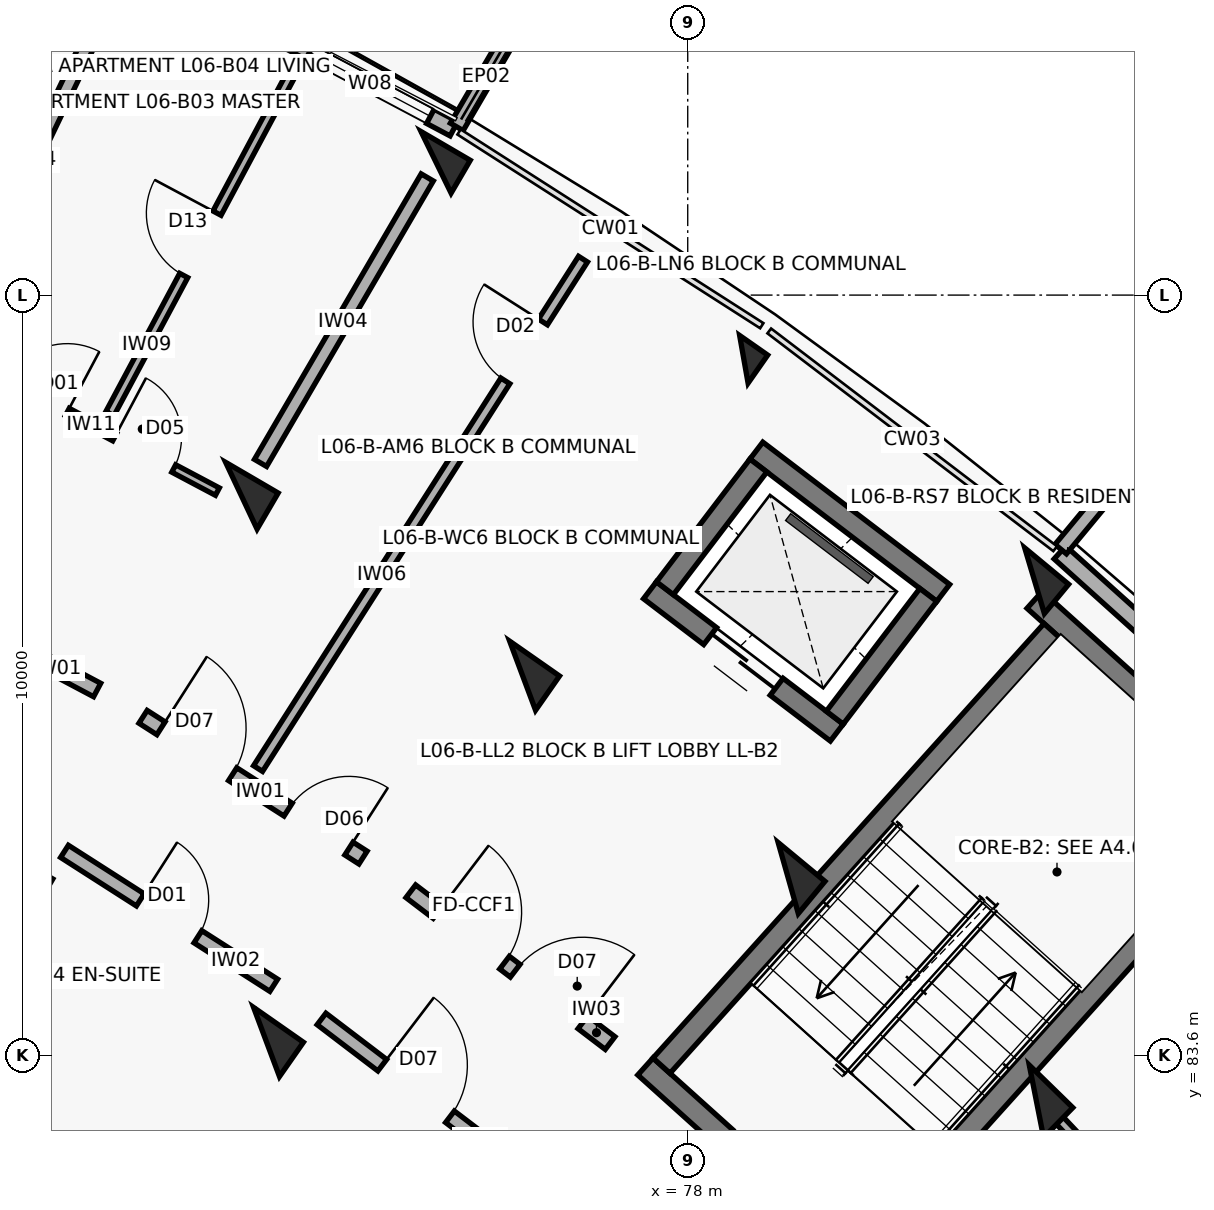
"""IFC4 building model, lengths in metres.
Left out: names, types, materials, properties, quantities, classifications, styles, units other than length and angle.
Written with IfcOpenShell. Run it as: python <this file> out.ifc"""

import sys

from ifc_helpers import new_model, si_unit, direction, frame, frame_2d, origin, origin_2d, place, context, subcontext, project, spatial, rectangle, extrude, element, fill, save


model = new_model("IFC4")
c1 = context("Model", 3, precision=1e-05, world=origin(), true_north=direction((0.0, 1.0)))
c2 = subcontext(c1, "Body", "Model", "MODEL_VIEW")
j1 = project(units=[si_unit("LENGTHUNIT", "METRE"), si_unit("PLANEANGLEUNIT", "RADIAN")], contexts=[c1])
p1 = place(None, origin())
s1 = spatial("IfcSite", under=j1, at=p1, CompositionType="ELEMENT")
p2 = place(p1, origin())
s2 = spatial("IfcBuilding", under=s1, at=p2, CompositionType="ELEMENT")
p3 = place(p2, frame((0.0, 0.0, 20.5)))
s3 = spatial("IfcBuildingStorey", under=s2, at=p3, CompositionType="ELEMENT", Elevation=20.5)
for number, where, z_axis, x_axis in (
    (1, (69.163, 85.882, 0.0), (0.0, 0.0, 1.0), (0.504, 0.864, 0.0)),
    (2, (72.127, 90.96, 0.0), (0.0, 0.0, 1.0), (0.504, 0.864, 0.0)),
):
    element("IfcColumn", number, at=place(p3, frame(where, z_axis=z_axis, x_axis=x_axis)), inside=s3, PredefinedType="COLUMN", context=c2, shape_type="SweptSolid", body=[
        extrude(rectangle(XDim=0.55, YDim=0.8, at=origin_2d()), origin(), (0.0, 0.0, 1.0), 3.1),
    ])
p4 = place(p3, frame((74.689, 95.347, 0.0), z_axis=(0.0, 0.0, 1.0), x_axis=(0.504226211181, 0.863571611366, 0.0)))
e3 = element("IfcColumn", 3, at=p4, inside=s3, PredefinedType="COLUMN", context=c2, shape_type="SweptSolid", body=[
    extrude(rectangle(XDim=0.5, YDim=0.75, at=origin_2d()), origin(), (0.0, 0.0, 1.0), 3.1),
])
for number, where, z_axis, x_axis in (
    (4, (72.458, 83.773, 0.0), (0.0, 0.0, 1.0), (0.573, 0.82, 0.0)),
    (5, (75.828, 88.592, 0.0), (0.0, 0.0, 1.0), (0.573, 0.82, 0.0)),
):
    element("IfcColumn", number, at=place(p3, frame(where, z_axis=z_axis, x_axis=x_axis)), inside=s3, PredefinedType="COLUMN", context=c2, shape_type="SweptSolid", body=[
        extrude(rectangle(XDim=0.55, YDim=0.8, at=origin_2d()), origin(), (0.0, 0.0, 1.0), 3.1),
    ])
p5 = place(p3, frame((78.739, 92.755, 0.0), z_axis=(0.0, 0.0, 1.0), x_axis=(0.573004420611, 0.819552276527, 0.0)))
e6 = element("IfcColumn", 6, at=p5, inside=s3, PredefinedType="COLUMN", context=c2, shape_type="SweptSolid", body=[
    extrude(rectangle(XDim=0.45, YDim=0.45, at=origin_2d()), origin(), (0.0, 0.0, 1.0), 3.1),
])
p6 = place(p3, frame((79.322, 85.93, 0.0), z_axis=(0.0, 0.0, 1.0), x_axis=(0.637961754089, 0.770068049148, 0.0)))
e7 = element("IfcColumn", 7, at=p6, inside=s3, PredefinedType="COLUMN", context=c2, shape_type="SweptSolid", body=[
    extrude(rectangle(XDim=0.55, YDim=0.8, at=origin_2d()), origin(), (0.0, 0.0, 1.0), 3.1),
])
p7 = place(p3, frame((82.563, 89.842, 0.0), z_axis=(0.0, 0.0, 1.0), x_axis=(0.637961754089, 0.770068049148, 0.0)))
e8 = element("IfcColumn", 8, at=p7, inside=s3, PredefinedType="COLUMN", context=c2, shape_type="SweptSolid", body=[
    extrude(rectangle(XDim=0.5, YDim=0.75, at=origin_2d()), origin(), (0.0, 0.0, 1.0), 3.1),
])
p8 = place(p3, frame((82.588, 82.991, 0.0), z_axis=(0.0, 0.0, 1.0), x_axis=(0.698665066769, 0.715448897181, 0.0)))
e9 = element("IfcColumn", 9, at=p8, inside=s3, PredefinedType="COLUMN", context=c2, shape_type="SweptSolid", body=[
    extrude(rectangle(XDim=0.55, YDim=0.8, at=origin_2d()), origin(), (0.0, 0.0, 1.0), 3.1),
])
p9 = place(p3, frame((70.675, 98.042, 0.0), z_axis=(0.0, 0.0, 1.0), x_axis=(0.883448093208, -0.468529045639, 0.0)))
e10 = element("IfcWall", 10, at=p9, inside=s3, PredefinedType="SOLIDWALL", context=c2, shape_type="SweptSolid", body=[
    extrude(rectangle(XDim=4.809, YDim=0.212, at=frame_2d((2.405, 0.0))), origin(), (0.0, 0.0, 1.0), 2.25),
])
p10 = place(p9, frame((0.4, 0.0, 0.0)))
e11 = element("IfcOpeningElement", 11, at=p10, cuts=e10, PredefinedType="OPENING", context=c2, shape_type="SweptSolid", body=[
    extrude(rectangle(XDim=1.1, YDim=2.15, at=frame_2d((0.55, 1.075))), frame((0.0, 0.116, 0.0), z_axis=(0.0, -1.0, 0.0), x_axis=(1.0, 0.0, 0.0)), (0.0, 0.0, 1.0), 0.232),
])
p11 = place(p9, frame((2.659, 0.0, 0.35)))
e12 = element("IfcOpeningElement", 12, at=p11, cuts=e10, PredefinedType="OPENING", context=c2, shape_type="SweptSolid", body=[
    extrude(rectangle(XDim=1.8, YDim=1.65, at=frame_2d((0.9, 0.825))), frame((0.0, 0.116, 0.0), z_axis=(0.0, -1.0, 0.0), x_axis=(1.0, 0.0, 0.0)), (0.0, 0.0, 1.0), 0.232),
])
p12 = place(p3, frame((74.961, 95.813, 0.0), z_axis=(0.0, 0.0, 1.0), x_axis=(0.504228145431, 0.863570481985, 0.0)))
e13 = element("IfcWall", 13, at=p12, inside=s3, PredefinedType="PARAPET", context=c2, shape_type="SweptSolid", body=[
    extrude(rectangle(XDim=1.53, YDim=0.195, at=frame_2d((0.765, 0.0))), origin(), (0.0, 0.0, 1.0), 2.25),
])
p13 = place(p3, frame((82.897, 90.213, 0.0), z_axis=(0.0, 0.0, 1.0), x_axis=(0.743387539862, -0.668860946369, 0.0)))
e14 = element("IfcWall", 14, at=p13, inside=s3, PredefinedType="SOLIDWALL", context=c2, shape_type="SweptSolid", body=[
    extrude(rectangle(XDim=4.809, YDim=0.228, at=frame_2d((2.405, 0.0))), origin(), (0.0, 0.0, 1.0), 2.25),
])
p14 = place(p3, frame((82.908, 90.257, 0.0), z_axis=(0.0, 0.0, 1.0), x_axis=(0.637967316825, 0.770063440674, 0.0)))
e15 = element("IfcWall", 15, at=p14, inside=s3, PredefinedType="PARAPET", context=c2, shape_type="SweptSolid", body=[
    extrude(rectangle(XDim=0.9, YDim=0.195, at=frame_2d((0.45, 0.0))), origin(), (0.0, 0.0, 1.0), 2.25),
])
p15 = place(p3, frame((80.32, 80.862, 0.0), z_axis=(0.0, 0.0, 1.0), x_axis=(-0.743375696158, 0.668874109501, 0.0)))
e16 = element("IfcWall", 16, at=p15, inside=s3, PredefinedType="SHEAR", context=c2, shape_type="SweptSolid", body=[
    extrude(rectangle(XDim=3.87, YDim=0.3, at=frame_2d((1.935, 0.0))), origin(), (0.0, 0.0, 1.0), 3.1),
])
p16 = place(p15, frame((1.41, 0.0, 0.0)))
e17 = element("IfcOpeningElement", 17, at=p16, cuts=e16, PredefinedType="OPENING", context=c2, shape_type="SweptSolid", body=[
    extrude(rectangle(XDim=1.05, YDim=2.15, at=frame_2d((0.525, 1.075))), frame((0.0, 0.16, 0.0), z_axis=(0.0, -1.0, 0.0), x_axis=(1.0, 0.0, 0.0)), (0.0, 0.0, 1.0), 0.32),
])
p17 = place(p3, frame((85.887, 86.601, 0.0), z_axis=(0.0, 0.0, 1.0), x_axis=(-0.743400052815, 0.668847038922, 0.0)))
e18 = element("IfcWall", 18, at=p17, inside=s3, PredefinedType="SHEAR", context=c2, shape_type="SweptSolid", body=[
    extrude(rectangle(XDim=4.47, YDim=0.3, at=frame_2d((2.235, 0.0))), origin(), (0.0, 0.0, 1.0), 3.1),
])
p18 = place(p3, frame((80.309, 81.073, 0.0), z_axis=(0.0, 0.0, 1.0), x_axis=(0.668885797871, 0.743365179038, 0.0)))
e19 = element("IfcWall", 19, at=p18, inside=s3, PredefinedType="SHEAR", context=c2, shape_type="SweptSolid", body=[
    extrude(rectangle(XDim=7.69, YDim=0.3, at=frame_2d((3.845, 0.0))), origin(), (0.0, 0.0, 1.0), 3.1),
])
p19 = place(p3, frame((77.655, 83.461, 0.0), z_axis=(0.0, 0.0, 1.0), x_axis=(0.668868253964, 0.743380964808, 0.0)))
e20 = element("IfcWall", 20, at=p19, inside=s3, PredefinedType="SHEAR", context=c2, shape_type="SweptSolid", body=[
    extrude(rectangle(XDim=7.69, YDim=0.3, at=frame_2d((3.845, 0.0))), origin(), (0.0, 0.0, 1.0), 3.1),
])
p20 = place(p3, frame((79.961, 87.844, 0.0), z_axis=(0.0, 0.0, 1.0), x_axis=(-0.795464365424, 0.606000365793, 0.0)))
e21 = element("IfcWall", 21, at=p20, inside=s3, PredefinedType="SHEAR", context=c2, shape_type="SweptSolid", body=[
    extrude(rectangle(XDim=3.09, YDim=0.28, at=frame_2d((1.545, 0.0))), origin(), (0.0, 0.0, 1.0), 3.1),
])
p21 = place(p20, frame((0.995, 0.0, 0.0)))
e22 = element("IfcOpeningElement", 22, at=p21, cuts=e21, PredefinedType="OPENING", context=c2, shape_type="SweptSolid", body=[
    extrude(rectangle(XDim=1.1, YDim=2.15, at=frame_2d((0.55, 1.075))), frame((0.0, 0.15, 0.0), z_axis=(0.0, -1.0, 0.0), x_axis=(1.0, 0.0, 0.0)), (0.0, 0.0, 1.0), 0.3),
])
p22 = place(p3, frame((81.361, 89.681, 0.0), z_axis=(0.0, 0.0, 1.0), x_axis=(-0.795502452183, 0.605950368076, 0.0)))
e23 = element("IfcWall", 23, at=p22, inside=s3, PredefinedType="SHEAR", context=c2, shape_type="SweptSolid", body=[
    extrude(rectangle(XDim=3.09, YDim=0.28, at=frame_2d((1.545, 0.0))), origin(), (0.0, 0.0, 1.0), 3.1),
])
for number, where, z_axis, x_axis in (
    (24, (79.935, 88.04, 0.0), (0.0, 0.0, 1.0), (0.606, 0.795, 0.0)),
    (25, (77.699, 89.743, 0.0), (0.0, 0.0, 1.0), (0.606, 0.795, 0.0)),
):
    element("IfcWall", number, at=place(p3, frame(where, z_axis=z_axis, x_axis=x_axis)), inside=s3, PredefinedType="SHEAR", context=c2, shape_type="SweptSolid", body=[
        extrude(rectangle(XDim=2.03, YDim=0.28, at=frame_2d((1.015, 0.0))), origin(), (0.0, 0.0, 1.0), 3.1),
    ])
p23 = place(p3, frame((67.194, 90.014, 0.0), z_axis=(0.0, 0.0, 1.0), x_axis=(0.883410853063, -0.468599258099, 0.0)))
e26 = element("IfcWall", 26, at=p23, inside=s3, PredefinedType="SOLIDWALL", context=c2, shape_type="SweptSolid", body=[
    extrude(rectangle(XDim=3.436, YDim=0.2, at=frame_2d((1.718, 0.0))), origin(), (0.0, 0.0, 1.0), 2.08),
])
p24 = place(p23, frame((1.208, 0.0, 0.0)))
e27 = element("IfcOpeningElement", 27, at=p24, cuts=e26, PredefinedType="OPENING", context=c2, shape_type="SweptSolid", body=[
    extrude(rectangle(XDim=1.02, YDim=2.15, at=frame_2d((0.51, 1.075))), frame((0.0, 0.11, 0.0), z_axis=(0.0, -1.0, 0.0), x_axis=(1.0, 0.0, 0.0)), (0.0, 0.0, 1.0), 0.22),
])
p25 = place(p3, frame((68.468, 92.788, 0.0), z_axis=(0.0, 0.0, 1.0), x_axis=(0.883450371448, -0.468524749814, 0.0)))
e28 = element("IfcWall", 28, at=p25, inside=s3, PredefinedType="PARTITIONING", context=c2, shape_type="SweptSolid", body=[
    extrude(rectangle(XDim=3.785, YDim=0.11, at=frame_2d((1.893, 0.0))), origin(), (0.0, 0.0, 1.0), 2.08),
])
p26 = place(p25, frame((0.65, 0.0, 0.0)))
e29 = element("IfcOpeningElement", 29, at=p26, cuts=e28, PredefinedType="OPENING", context=c2, shape_type="SweptSolid", body=[
    extrude(rectangle(XDim=0.9, YDim=2.1, at=frame_2d((0.45, 1.05))), frame((0.0, 0.065, 0.0), z_axis=(0.0, -1.0, 0.0), x_axis=(1.0, 0.0, 0.0)), (0.0, 0.0, 1.0), 0.13),
])
p27 = place(p25, frame((2.255, 0.0, 0.0)))
e30 = element("IfcOpeningElement", 30, at=p27, cuts=e28, PredefinedType="OPENING", context=c2, shape_type="SweptSolid", body=[
    extrude(rectangle(XDim=0.88, YDim=2.1, at=frame_2d((0.44, 1.05))), frame((0.0, 0.065, 0.0), z_axis=(0.0, -1.0, 0.0), x_axis=(1.0, 0.0, 0.0)), (0.0, 0.0, 1.0), 0.13),
])
p28 = place(p3, frame((70.398, 92.041, 0.0), z_axis=(0.0, 0.0, 1.0), x_axis=(0.471222960991, 0.882014127457, 0.0)))
e31 = element("IfcWall", 31, at=p28, inside=s3, PredefinedType="PARTITIONING", context=c2, shape_type="SweptSolid", body=[
    extrude(rectangle(XDim=5.05, YDim=0.12, at=frame_2d((2.525, 0.0))), origin(), (0.0, 0.0, 1.0), 2.08),
])
p29 = place(p28, frame((2.06, 0.0, 0.0)))
e32 = element("IfcOpeningElement", 32, at=p29, cuts=e31, PredefinedType="OPENING", context=c2, shape_type="SweptSolid", body=[
    extrude(rectangle(XDim=0.93, YDim=2.1, at=frame_2d((0.465, 1.05))), frame((0.0, 0.07, 0.0), z_axis=(0.0, -1.0, 0.0), x_axis=(1.0, 0.0, 0.0)), (0.0, 0.0, 1.0), 0.14),
])
p30 = place(p3, frame((68.462, 93.469, 0.0), z_axis=(0.0, 0.0, 1.0), x_axis=(0.432086898897, 0.901831975371, 0.0)))
e33 = element("IfcWall", 33, at=p30, inside=s3, PredefinedType="SOLIDWALL", context=c2, shape_type="SweptSolid", body=[
    extrude(rectangle(XDim=4.35, YDim=0.185, at=frame_2d((2.175, 0.0))), origin(), (0.0, 0.0, 1.0), 2.08),
])
p31 = place(p3, frame((70.834, 88.051, 0.0), z_axis=(0.0, 0.0, 1.0), x_axis=(0.842257205985, -0.539075874963, 0.0)))
e34 = element("IfcWall", 34, at=p31, inside=s3, PredefinedType="SOLIDWALL", context=c2, shape_type="SweptSolid", body=[
    extrude(rectangle(XDim=3.436, YDim=0.2, at=frame_2d((1.718, 0.0))), origin(), (0.0, 0.0, 1.0), 2.08),
])
p32 = place(p31, frame((0.28, 0.0, 0.0)))
e35 = element("IfcOpeningElement", 35, at=p32, cuts=e34, PredefinedType="OPENING", context=c2, shape_type="SweptSolid", body=[
    extrude(rectangle(XDim=1.12, YDim=2.15, at=frame_2d((0.56, 1.075))), frame((0.0, 0.11, 0.0), z_axis=(0.0, -1.0, 0.0), x_axis=(1.0, 0.0, 0.0)), (0.0, 0.0, 1.0), 0.22),
])
p33 = place(p31, frame((2.266, 0.0, 0.0)))
e36 = element("IfcOpeningElement", 36, at=p33, cuts=e34, PredefinedType="OPENING", context=c2, shape_type="SweptSolid", body=[
    extrude(rectangle(XDim=0.95, YDim=2.1, at=frame_2d((0.475, 1.05))), frame((0.0, 0.11, 0.0), z_axis=(0.0, -1.0, 0.0), x_axis=(1.0, 0.0, 0.0)), (0.0, 0.0, 1.0), 0.22),
])
p34 = place(p3, frame((69.8, 86.281, 0.0), z_axis=(0.0, 0.0, 1.0), x_axis=(0.842225276846, -0.539125758095, 0.0)))
e37 = element("IfcWall", 37, at=p34, inside=s3, PredefinedType="SOLIDWALL", context=c2, shape_type="SweptSolid", body=[
    extrude(rectangle(XDim=3.269, YDim=0.19, at=frame_2d((1.634, 0.0))), origin(), (0.0, 0.0, 1.0), 2.08),
])
p35 = place(p34, frame((1.184, 0.0, 0.0)))
e38 = element("IfcOpeningElement", 38, at=p35, cuts=e37, PredefinedType="OPENING", context=c2, shape_type="SweptSolid", body=[
    extrude(rectangle(XDim=0.9, YDim=2.1, at=frame_2d((0.45, 1.05))), frame((0.0, 0.105, 0.0), z_axis=(0.0, -1.0, 0.0), x_axis=(1.0, 0.0, 0.0)), (0.0, 0.0, 1.0), 0.21),
])
p36 = place(p3, frame((72.347, 87.37, 0.0), z_axis=(0.0, 0.0, 1.0), x_axis=(0.537777309481, 0.843086926365, 0.0)))
e39 = element("IfcWall", 39, at=p36, inside=s3, PredefinedType="PARTITIONING", context=c2, shape_type="SweptSolid", body=[
    extrude(rectangle(XDim=7.95, YDim=0.14, at=frame_2d((3.975, 0.0))), origin(), (0.0, 0.0, 1.0), 2.08),
])
p37 = place(p36, frame((6.05, 0.0, 0.0)))
e40 = element("IfcOpeningElement", 40, at=p37, cuts=e39, PredefinedType="OPENING", context=c2, shape_type="SweptSolid", body=[
    extrude(rectangle(XDim=0.92, YDim=2.1, at=frame_2d((0.46, 1.05))), frame((0.0, 0.08, 0.0), z_axis=(0.0, -1.0, 0.0), x_axis=(1.0, 0.0, 0.0)), (0.0, 0.0, 1.0), 0.16),
])
p38 = place(p3, frame((72.379, 91.392, 0.0), z_axis=(0.0, 0.0, 1.0), x_axis=(0.504216452091, 0.863577309475, 0.0)))
e41 = element("IfcWall", 41, at=p38, inside=s3, PredefinedType="SOLIDWALL", context=c2, shape_type="SweptSolid", body=[
    extrude(rectangle(XDim=4.35, YDim=0.185, at=frame_2d((2.175, 0.0))), origin(), (0.0, 0.0, 1.0), 2.08),
])
p39 = place(p3, frame((74.357, 85.756, 0.0), z_axis=(0.0, 0.0, 1.0), x_axis=(0.795498026433, -0.605956178235, 0.0)))
e42 = element("IfcWall", 42, at=p39, inside=s3, PredefinedType="SOLIDWALL", context=c2, shape_type="SweptSolid", body=[
    extrude(rectangle(XDim=3.296, YDim=0.21, at=frame_2d((1.648, 0.0))), origin(), (0.0, 0.0, 1.0), 2.08),
])
p40 = place(p39, frame((0.45, 0.0, 0.0)))
e43 = element("IfcOpeningElement", 43, at=p40, cuts=e42, PredefinedType="OPENING", context=c2, shape_type="SweptSolid", body=[
    extrude(rectangle(XDim=1.1, YDim=2.15, at=frame_2d((0.55, 1.075))), frame((0.0, 0.115, 0.0), z_axis=(0.0, -1.0, 0.0), x_axis=(1.0, 0.0, 0.0)), (0.0, 0.0, 1.0), 0.23),
])
p41 = place(p39, frame((1.726, 0.0, 0.0)))
e44 = element("IfcOpeningElement", 44, at=p41, cuts=e42, PredefinedType="OPENING", context=c2, shape_type="SweptSolid", body=[
    extrude(rectangle(XDim=1.12, YDim=2.15, at=frame_2d((0.56, 1.075))), frame((0.0, 0.115, 0.0), z_axis=(0.0, -1.0, 0.0), x_axis=(1.0, 0.0, 0.0)), (0.0, 0.0, 1.0), 0.23),
])
p42 = place(p3, frame((73.182, 84.076, 0.0), z_axis=(0.0, 0.0, 1.0), x_axis=(0.795501577908, -0.605951515838, 0.0)))
e45 = element("IfcWall", 45, at=p42, inside=s3, PredefinedType="SOLIDWALL", context=c2, shape_type="SweptSolid", body=[
    extrude(rectangle(XDim=3.129, YDim=0.19, at=frame_2d((1.564, 0.0))), origin(), (0.0, 0.0, 1.0), 2.08),
])
p43 = place(p42, frame((1.004, 0.0, 0.0)))
e46 = element("IfcOpeningElement", 46, at=p43, cuts=e45, PredefinedType="OPENING", context=c2, shape_type="SweptSolid", body=[
    extrude(rectangle(XDim=1.12, YDim=2.15, at=frame_2d((0.56, 1.075))), frame((0.0, 0.105, 0.0), z_axis=(0.0, -1.0, 0.0), x_axis=(1.0, 0.0, 0.0)), (0.0, 0.0, 1.0), 0.21),
])
p44 = place(p3, frame((82.829, 82.809, 0.0), z_axis=(0.0, 0.0, 1.0), x_axis=(0.686300649561, -0.727317962388, 0.0)))
e47 = element("IfcWall", 47, at=p44, inside=s3, PredefinedType="PARTITIONING", context=c2, shape_type="SweptSolid", body=[
    extrude(rectangle(XDim=3.797, YDim=0.13, at=frame_2d((1.899, 0.0))), origin(), (0.0, 0.0, 1.0), 2.08),
])
p45 = place(p44, frame((0.65, 0.0, 0.0)))
e48 = element("IfcOpeningElement", 48, at=p45, cuts=e47, PredefinedType="OPENING", context=c2, shape_type="SweptSolid", body=[
    extrude(rectangle(XDim=0.9, YDim=2.1, at=frame_2d((0.45, 1.05))), frame((0.0, 0.075, 0.0), z_axis=(0.0, -1.0, 0.0), x_axis=(1.0, 0.0, 0.0)), (0.0, 0.0, 1.0), 0.15),
])
p46 = place(p44, frame((2.267, 0.0, 0.0)))
e49 = element("IfcOpeningElement", 49, at=p46, cuts=e47, PredefinedType="OPENING", context=c2, shape_type="SweptSolid", body=[
    extrude(rectangle(XDim=0.88, YDim=2.1, at=frame_2d((0.44, 1.05))), frame((0.0, 0.075, 0.0), z_axis=(0.0, -1.0, 0.0), x_axis=(1.0, 0.0, 0.0)), (0.0, 0.0, 1.0), 0.15),
])
p47 = place(p11, origin())
e50 = element("IfcWindow", 50, at=p47, inside=s3, PartitioningType="TRIPLE_PANEL_VERTICAL", PredefinedType="WINDOW", context=c2, shape_type="SweptSolid", body=[
    extrude(rectangle(XDim=1.8, YDim=1.65, at=frame_2d((0.9, 0.825))), frame((0.0, 0.03, 0.0), z_axis=(0.0, -1.0, 0.0), x_axis=(1.0, 0.0, 0.0)), (0.0, 0.0, 1.0), 0.06),
])
fill(e12, e50)
p48 = place(p21, origin())
e51 = element("IfcDoor", 51, at=p48, inside=s3, OperationType="DOUBLE_DOOR_SLIDING", PredefinedType="DOOR", context=c2, shape_type="SweptSolid", body=[
    extrude(rectangle(XDim=1.1, YDim=2.15, at=frame_2d((0.55, 1.075))), frame((0.0, 0.025, 0.0), z_axis=(0.0, -1.0, 0.0), x_axis=(1.0, 0.0, 0.0)), (0.0, 0.0, 1.0), 0.05),
])
fill(e22, e51)
p49 = place(p26, origin())
e52 = element("IfcDoor", 52, at=p49, inside=s3, OperationType="SINGLE_SWING_RIGHT", PredefinedType="DOOR", context=c2, shape_type="SweptSolid", body=[
    extrude(rectangle(XDim=0.9, YDim=2.1, at=frame_2d((0.45, 1.05))), frame((0.0, 0.025, 0.0), z_axis=(0.0, -1.0, 0.0), x_axis=(1.0, 0.0, 0.0)), (0.0, 0.0, 1.0), 0.05),
])
fill(e29, e52)
p50 = place(p27, origin())
e53 = element("IfcDoor", 53, at=p50, inside=s3, OperationType="SINGLE_SWING_LEFT", PredefinedType="DOOR", context=c2, shape_type="SweptSolid", body=[
    extrude(rectangle(XDim=0.88, YDim=2.1, at=frame_2d((0.44, 1.05))), frame((0.0, 0.025, 0.0), z_axis=(0.0, -1.0, 0.0), x_axis=(1.0, 0.0, 0.0)), (0.0, 0.0, 1.0), 0.05),
])
fill(e30, e53)
p51 = place(p29, origin())
e54 = element("IfcDoor", 54, at=p51, inside=s3, OperationType="SINGLE_SWING_RIGHT", PredefinedType="DOOR", context=c2, shape_type="SweptSolid", body=[
    extrude(rectangle(XDim=0.93, YDim=2.1, at=frame_2d((0.465, 1.05))), frame((0.0, 0.025, 0.0), z_axis=(0.0, -1.0, 0.0), x_axis=(1.0, 0.0, 0.0)), (0.0, 0.0, 1.0), 0.05),
])
fill(e32, e54)
p52 = place(p32, origin())
e55 = element("IfcDoor", 55, at=p52, inside=s3, OperationType="SINGLE_SWING_LEFT", PredefinedType="DOOR", context=c2, shape_type="SweptSolid", body=[
    extrude(rectangle(XDim=1.12, YDim=2.15, at=frame_2d((0.56, 1.075))), frame((0.0, 0.025, 0.0), z_axis=(0.0, -1.0, 0.0), x_axis=(1.0, 0.0, 0.0)), (0.0, 0.0, 1.0), 0.05),
])
fill(e35, e55)
p53 = place(p33, origin())
e56 = element("IfcDoor", 56, at=p53, inside=s3, OperationType="SINGLE_SWING_RIGHT", PredefinedType="DOOR", context=c2, shape_type="SweptSolid", body=[
    extrude(rectangle(XDim=0.95, YDim=2.1, at=frame_2d((0.475, 1.05))), frame((0.0, 0.025, 0.0), z_axis=(0.0, -1.0, 0.0), x_axis=(1.0, 0.0, 0.0)), (0.0, 0.0, 1.0), 0.05),
])
fill(e36, e56)
p54 = place(p35, origin())
e57 = element("IfcDoor", 57, at=p54, inside=s3, OperationType="SINGLE_SWING_LEFT", PredefinedType="DOOR", context=c2, shape_type="SweptSolid", body=[
    extrude(rectangle(XDim=0.9, YDim=2.1, at=frame_2d((0.45, 1.05))), frame((0.0, 0.025, 0.0), z_axis=(0.0, -1.0, 0.0), x_axis=(1.0, 0.0, 0.0)), (0.0, 0.0, 1.0), 0.05),
])
fill(e38, e57)
p55 = place(p37, origin())
e58 = element("IfcDoor", 58, at=p55, inside=s3, OperationType="SINGLE_SWING_RIGHT", PredefinedType="DOOR", context=c2, shape_type="SweptSolid", body=[
    extrude(rectangle(XDim=0.92, YDim=2.1, at=frame_2d((0.46, 1.05))), frame((0.0, 0.025, 0.0), z_axis=(0.0, -1.0, 0.0), x_axis=(1.0, 0.0, 0.0)), (0.0, 0.0, 1.0), 0.05),
])
fill(e40, e58)
p56 = place(p40, origin())
e59 = element("IfcDoor", 59, at=p56, inside=s3, OperationType="SINGLE_SWING_LEFT", PredefinedType="DOOR", context=c2, shape_type="SweptSolid", body=[
    extrude(rectangle(XDim=1.1, YDim=2.15, at=frame_2d((0.55, 1.075))), frame((0.0, 0.025, 0.0), z_axis=(0.0, -1.0, 0.0), x_axis=(1.0, 0.0, 0.0)), (0.0, 0.0, 1.0), 0.05),
])
fill(e43, e59)
p57 = place(p41, origin())
e60 = element("IfcDoor", 60, at=p57, inside=s3, OperationType="SINGLE_SWING_RIGHT", PredefinedType="DOOR", context=c2, shape_type="SweptSolid", body=[
    extrude(rectangle(XDim=1.12, YDim=2.15, at=frame_2d((0.56, 1.075))), frame((0.0, 0.025, 0.0), z_axis=(0.0, -1.0, 0.0), x_axis=(1.0, 0.0, 0.0)), (0.0, 0.0, 1.0), 0.05),
])
fill(e44, e60)
p58 = place(p43, origin())
e61 = element("IfcDoor", 61, at=p58, inside=s3, OperationType="SINGLE_SWING_LEFT", PredefinedType="DOOR", context=c2, shape_type="SweptSolid", body=[
    extrude(rectangle(XDim=1.12, YDim=2.15, at=frame_2d((0.56, 1.075))), frame((0.0, 0.025, 0.0), z_axis=(0.0, -1.0, 0.0), x_axis=(1.0, 0.0, 0.0)), (0.0, 0.0, 1.0), 0.05),
])
fill(e46, e61)
save(model, sys.argv[1])
